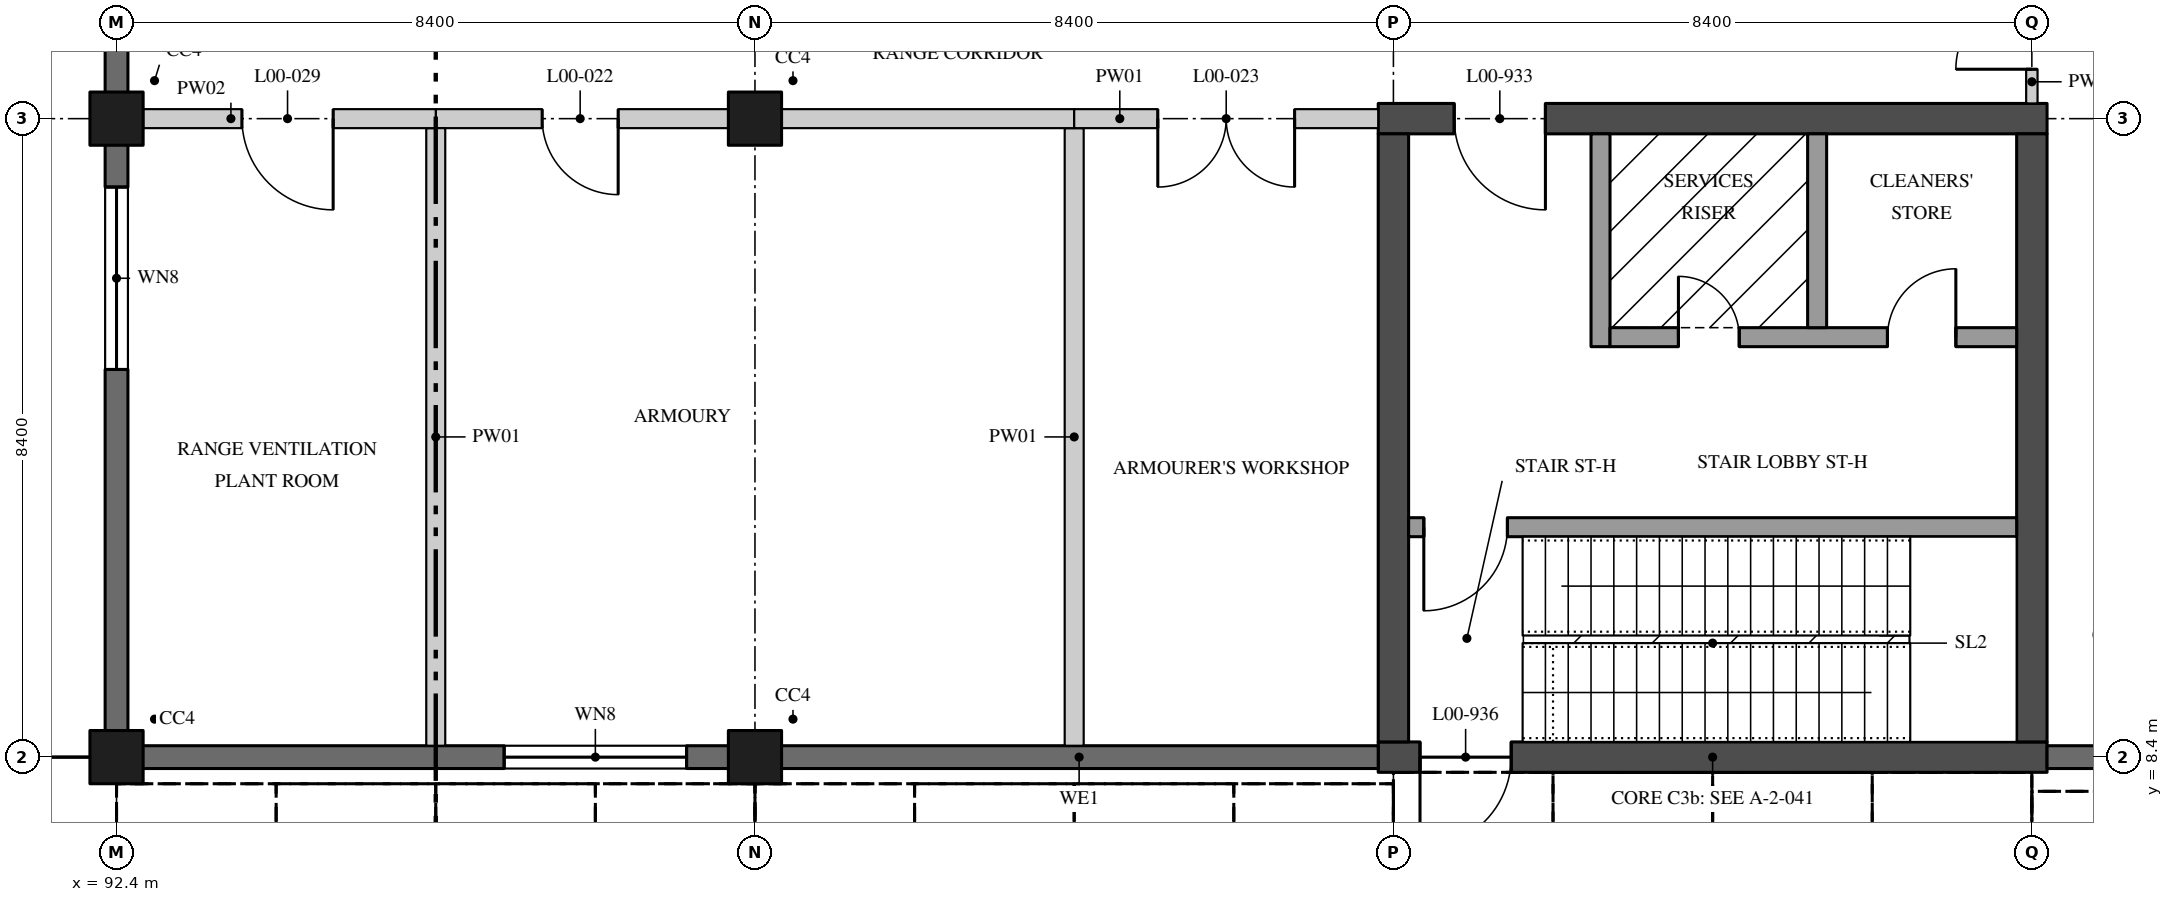
"""IFC4 building model, lengths in metres.
Left out: names, types, materials, properties, quantities, classifications, styles, units other than length and angle.
Written with IfcOpenShell. Run it as: python <this file> out.ifc"""

import sys

from ifc_helpers import new_model, si_unit, direction, frame, frame_2d, origin, origin_2d, place, context, subcontext, project, spatial, rectangle, extrude, element, fill, save


model = new_model("IFC4")
c1 = context("Model", 3, precision=1e-05, world=origin(), true_north=direction((0.0, 1.0)))
c2 = subcontext(c1, "Body", "Model", "MODEL_VIEW")
j1 = project(units=[si_unit("LENGTHUNIT", "METRE"), si_unit("PLANEANGLEUNIT", "RADIAN")], contexts=[c1])
p1 = place(None, origin())
s1 = spatial("IfcSite", under=j1, at=p1, CompositionType="ELEMENT")
p2 = place(p1, origin())
s2 = spatial("IfcBuilding", under=s1, at=p2, CompositionType="ELEMENT")
p3 = place(p2, origin())
s3 = spatial("IfcBuildingStorey", under=s2, at=p3, CompositionType="ELEMENT", Elevation=0.0)
for number, where, z_axis, x_axis in (
    (1, (92.4, 8.4, 0.0), (0.0, 0.0, 1.0), (1.0, 0.0, 0.0)),
    (2, (92.4, 16.8, 0.0), (0.0, 0.0, 1.0), (1.0, 0.0, 0.0)),
    (3, (100.8, 8.4, 0.0), (0.0, 0.0, 1.0), (1.0, 0.0, 0.0)),
    (4, (100.8, 16.8, 0.0), (0.0, 0.0, 1.0), (1.0, 0.0, 0.0)),
):
    element("IfcColumn", number, at=place(p3, frame(where, z_axis=z_axis, x_axis=x_axis)), inside=s3, PredefinedType="COLUMN", context=c2, shape_type="SweptSolid", body=[
        extrude(rectangle(XDim=0.7, YDim=0.7, at=origin_2d()), origin(), (0.0, 0.0, 1.0), 5.05),
    ])
p4 = place(p3, frame((109.0, 8.4, 0.0), z_axis=(0.0, 0.0, 1.0), x_axis=(1.0, 0.0, 0.0)))
e5 = element("IfcWall", 5, at=p4, inside=s3, PredefinedType="SHEAR", context=c2, shape_type="SweptSolid", body=[
    extrude(rectangle(XDim=8.8, YDim=0.4, at=frame_2d((4.4, 0.0))), origin(), (0.0, 0.0, 1.0), 5.05),
])
p5 = place(p4, frame((0.55, 0.0, 0.0)))
e6 = element("IfcOpeningElement", 6, at=p5, cuts=e5, PredefinedType="OPENING", context=c2, shape_type="SweptSolid", body=[
    extrude(rectangle(XDim=1.2, YDim=2.1, at=frame_2d((0.6, 1.05))), frame((0.0, 0.21, 0.0), z_axis=(0.0, -1.0, 0.0), x_axis=(1.0, 0.0, 0.0)), (0.0, 0.0, 1.0), 0.42),
])
p6 = place(p3, frame((109.0, 16.8, 0.0), z_axis=(0.0, 0.0, 1.0), x_axis=(1.0, 0.0, 0.0)))
e7 = element("IfcWall", 7, at=p6, inside=s3, PredefinedType="SHEAR", context=c2, shape_type="SweptSolid", body=[
    extrude(rectangle(XDim=8.8, YDim=0.4, at=frame_2d((4.4, 0.0))), origin(), (0.0, 0.0, 1.0), 5.05),
])
p7 = place(p6, frame((1.0, 0.0, 0.0)))
e8 = element("IfcOpeningElement", 8, at=p7, cuts=e7, PredefinedType="OPENING", context=c2, shape_type="SweptSolid", body=[
    extrude(rectangle(XDim=1.2, YDim=2.1, at=frame_2d((0.6, 1.05))), frame((0.0, 0.21, 0.0), z_axis=(0.0, -1.0, 0.0), x_axis=(1.0, 0.0, 0.0)), (0.0, 0.0, 1.0), 0.42),
])
for number, where, z_axis, x_axis in (
    (9, (109.2, 8.6, 0.0), (0.0, 0.0, 1.0), (0.0, 1.0, 0.0)),
    (10, (117.6, 8.6, 0.0), (0.0, 0.0, 1.0), (0.0, 1.0, 0.0)),
):
    element("IfcWall", number, at=place(p3, frame(where, z_axis=z_axis, x_axis=x_axis)), inside=s3, PredefinedType="SHEAR", context=c2, shape_type="SweptSolid", body=[
        extrude(rectangle(XDim=8.0, YDim=0.4, at=frame_2d((4.0, 0.0))), origin(), (0.0, 0.0, 1.0), 5.05),
    ])
p8 = place(p3, frame((109.4, 11.425, 0.0), z_axis=(0.0, 0.0, 1.0), x_axis=(1.0, 0.0, 0.0)))
e11 = element("IfcWall", 11, at=p8, inside=s3, PredefinedType="SOLIDWALL", context=c2, shape_type="SweptSolid", body=[
    extrude(rectangle(XDim=8.0, YDim=0.25, at=frame_2d((4.0, 0.0))), origin(), (0.0, 0.0, 1.0), 5.05),
])
p9 = place(p8, frame((0.2, 0.0, 0.0)))
e12 = element("IfcOpeningElement", 12, at=p9, cuts=e11, PredefinedType="OPENING", context=c2, shape_type="SweptSolid", body=[
    extrude(rectangle(XDim=1.1, YDim=2.1, at=frame_2d((0.55, 1.05))), frame((0.0, 0.135, 0.0), z_axis=(0.0, -1.0, 0.0), x_axis=(1.0, 0.0, 0.0)), (0.0, 0.0, 1.0), 0.27),
])
p10 = place(p3, frame((111.925, 13.8, 0.0), z_axis=(0.0, 0.0, 1.0), x_axis=(0.0, 1.0, 0.0)))
e13 = element("IfcWall", 13, at=p10, inside=s3, PredefinedType="SOLIDWALL", context=c2, shape_type="SweptSolid", body=[
    extrude(rectangle(XDim=2.8, YDim=0.25, at=frame_2d((1.4, 0.0))), origin(), (0.0, 0.0, 1.0), 5.05),
])
p11 = place(p3, frame((112.05, 13.925, 0.0), z_axis=(0.0, 0.0, 1.0), x_axis=(1.0, 0.0, 0.0)))
e14 = element("IfcWall", 14, at=p11, inside=s3, PredefinedType="SOLIDWALL", context=c2, shape_type="SweptSolid", body=[
    extrude(rectangle(XDim=5.35, YDim=0.25, at=frame_2d((2.675, 0.0))), origin(), (0.0, 0.0, 1.0), 5.05),
])
p12 = place(p11, frame((3.65, 0.0, 0.0)))
e15 = element("IfcOpeningElement", 15, at=p12, cuts=e14, PredefinedType="OPENING", context=c2, shape_type="SweptSolid", body=[
    extrude(rectangle(XDim=0.9, YDim=2.1, at=frame_2d((0.45, 1.05))), frame((0.0, 0.135, 0.0), z_axis=(0.0, -1.0, 0.0), x_axis=(1.0, 0.0, 0.0)), (0.0, 0.0, 1.0), 0.27),
])
p13 = place(p11, frame((0.9, 0.0, 0.0)))
e16 = element("IfcOpeningElement", 16, at=p13, cuts=e14, PredefinedType="OPENING", context=c2, shape_type="SweptSolid", body=[
    extrude(rectangle(XDim=0.8, YDim=2.1, at=frame_2d((0.4, 1.05))), frame((0.0, 0.135, 0.0), z_axis=(0.0, -1.0, 0.0), x_axis=(1.0, 0.0, 0.0)), (0.0, 0.0, 1.0), 0.27),
])
p14 = place(p3, frame((114.775, 14.05, 0.0), z_axis=(0.0, 0.0, 1.0), x_axis=(0.0, 1.0, 0.0)))
e17 = element("IfcWall", 17, at=p14, inside=s3, PredefinedType="SOLIDWALL", context=c2, shape_type="SweptSolid", body=[
    extrude(rectangle(XDim=2.55, YDim=0.25, at=frame_2d((1.275, 0.0))), origin(), (0.0, 0.0, 1.0), 5.05),
])
p15 = place(p3, frame((105.0, 8.55, 0.0), z_axis=(0.0, 0.0, 1.0), x_axis=(0.0, 1.0, 0.0)))
e18 = element("IfcWall", 18, at=p15, inside=s3, PredefinedType="PARTITIONING", context=c2, shape_type="SweptSolid", body=[
    extrude(rectangle(XDim=8.125, YDim=0.25, at=frame_2d((4.062, 0.0))), origin(), (0.0, 0.0, 1.0), 5.05),
])
p16 = place(p3, frame((96.6, 16.8, 0.0), z_axis=(0.0, 0.0, 1.0), x_axis=(1.0, 0.0, 0.0)))
e19 = element("IfcWall", 19, at=p16, inside=s3, PredefinedType="PARTITIONING", context=c2, shape_type="SweptSolid", body=[
    extrude(rectangle(XDim=3.85, YDim=0.25, at=frame_2d((1.925, 0.0))), origin(), (0.0, 0.0, 1.0), 5.05),
])
p17 = place(p16, frame((1.4, 0.0, 0.0)))
e20 = element("IfcOpeningElement", 20, at=p17, cuts=e19, PredefinedType="OPENING", context=c2, shape_type="SweptSolid", body=[
    extrude(rectangle(XDim=1.0, YDim=2.1, at=frame_2d((0.5, 1.05))), frame((0.0, 0.135, 0.0), z_axis=(0.0, -1.0, 0.0), x_axis=(1.0, 0.0, 0.0)), (0.0, 0.0, 1.0), 0.27),
])
p18 = place(p3, frame((101.15, 16.8, 0.0), z_axis=(0.0, 0.0, 1.0), x_axis=(1.0, 0.0, 0.0)))
e21 = element("IfcWall", 21, at=p18, inside=s3, PredefinedType="PARTITIONING", context=c2, shape_type="SweptSolid", body=[
    extrude(rectangle(XDim=3.85, YDim=0.25, at=frame_2d((1.925, 0.0))), origin(), (0.0, 0.0, 1.0), 5.05),
])
p19 = place(p3, frame((96.6, 8.55, 0.0), z_axis=(0.0, 0.0, 1.0), x_axis=(0.0, 1.0, 0.0)))
e22 = element("IfcWall", 22, at=p19, inside=s3, PredefinedType="PARTITIONING", context=c2, shape_type="SweptSolid", body=[
    extrude(rectangle(XDim=8.125, YDim=0.25, at=frame_2d((4.062, 0.0))), origin(), (0.0, 0.0, 1.0), 5.05),
])
p20 = place(p3, frame((105.0, 16.8, 0.0), z_axis=(0.0, 0.0, 1.0), x_axis=(1.0, 0.0, 0.0)))
e23 = element("IfcWall", 23, at=p20, inside=s3, PredefinedType="PARTITIONING", context=c2, shape_type="SweptSolid", body=[
    extrude(rectangle(XDim=4.0, YDim=0.25, at=frame_2d((2.0, 0.0))), origin(), (0.0, 0.0, 1.0), 5.05),
])
p21 = place(p20, frame((1.1, 0.0, 0.0)))
e24 = element("IfcOpeningElement", 24, at=p21, cuts=e23, PredefinedType="OPENING", context=c2, shape_type="SweptSolid", body=[
    extrude(rectangle(XDim=1.8, YDim=2.7, at=frame_2d((0.9, 1.35))), frame((0.0, 0.135, 0.0), z_axis=(0.0, -1.0, 0.0), x_axis=(1.0, 0.0, 0.0)), (0.0, 0.0, 1.0), 0.27),
])
p22 = place(p3, frame((117.6, 17.0, 0.0), z_axis=(0.0, 0.0, 1.0), x_axis=(0.0, 1.0, 0.0)))
e25 = element("IfcWall", 25, at=p22, inside=s3, PredefinedType="PARTITIONING", context=c2, shape_type="SweptSolid", body=[
    extrude(rectangle(XDim=1.9, YDim=0.15, at=frame_2d((0.95, 0.0))), origin(), (0.0, 0.0, 1.0), 8.375),
])
p23 = place(p22, frame((0.45, 0.0, 0.0)))
e26 = element("IfcOpeningElement", 26, at=p23, cuts=e25, PredefinedType="OPENING", context=c2, shape_type="SweptSolid", body=[
    extrude(rectangle(XDim=1.0, YDim=2.1, at=frame_2d((0.5, 1.05))), frame((0.0, 0.085, 0.0), z_axis=(0.0, -1.0, 0.0), x_axis=(1.0, 0.0, 0.0)), (0.0, 0.0, 1.0), 0.17),
])
p24 = place(p3, frame((92.75, 16.8, 0.0), z_axis=(0.0, 0.0, 1.0), x_axis=(1.0, 0.0, 0.0)))
e27 = element("IfcWall", 27, at=p24, inside=s3, PredefinedType="PARTITIONING", context=c2, shape_type="SweptSolid", body=[
    extrude(rectangle(XDim=3.85, YDim=0.25, at=frame_2d((1.925, 0.0))), origin(), (0.0, 0.0, 1.0), 5.05),
])
p25 = place(p24, frame((1.3, 0.0, 0.0)))
e28 = element("IfcOpeningElement", 28, at=p25, cuts=e27, PredefinedType="OPENING", context=c2, shape_type="SweptSolid", body=[
    extrude(rectangle(XDim=1.2, YDim=2.4, at=frame_2d((0.6, 1.2))), frame((0.0, 0.135, 0.0), z_axis=(0.0, -1.0, 0.0), x_axis=(1.0, 0.0, 0.0)), (0.0, 0.0, 1.0), 0.27),
])
p26 = place(p3, frame((92.4, 25.0, 0.0), z_axis=(0.0, 0.0, 1.0), x_axis=(0.0, -1.0, 0.0)))
e29 = element("IfcWall", 29, at=p26, inside=s3, PredefinedType="SOLIDWALL", context=c2, shape_type="SweptSolid", body=[
    extrude(rectangle(XDim=7.87, YDim=0.3, at=frame_2d((3.935, 0.0))), origin(), (0.0, 0.0, 1.0), 5.05),
])
p27 = place(p3, frame((92.4, 16.47, 0.0), z_axis=(0.0, 0.0, 1.0), x_axis=(0.0, -1.0, 0.0)))
e30 = element("IfcWall", 30, at=p27, inside=s3, PredefinedType="SOLIDWALL", context=c2, shape_type="SweptSolid", body=[
    extrude(rectangle(XDim=7.74, YDim=0.3, at=frame_2d((3.87, 0.0))), origin(), (0.0, 0.0, 1.0), 5.05),
])
p28 = place(p27, frame((0.57, 0.0, 0.6)))
e31 = element("IfcOpeningElement", 31, at=p28, cuts=e30, PredefinedType="OPENING", context=c2, shape_type="SweptSolid", body=[
    extrude(rectangle(XDim=2.4, YDim=2.1, at=frame_2d((1.2, 1.05))), frame((0.0, 0.16, 0.0), z_axis=(0.0, -1.0, 0.0), x_axis=(1.0, 0.0, 0.0)), (0.0, 0.0, 1.0), 0.32),
])
p29 = place(p3, frame((92.73, 8.4, 0.0), z_axis=(0.0, 0.0, 1.0), x_axis=(1.0, 0.0, 0.0)))
e32 = element("IfcWall", 32, at=p29, inside=s3, PredefinedType="SOLIDWALL", context=c2, shape_type="SweptSolid", body=[
    extrude(rectangle(XDim=7.74, YDim=0.3, at=frame_2d((3.87, 0.0))), origin(), (0.0, 0.0, 1.0), 5.05),
])
p30 = place(p29, frame((4.77, 0.0, 0.6)))
e33 = element("IfcOpeningElement", 33, at=p30, cuts=e32, PredefinedType="OPENING", context=c2, shape_type="SweptSolid", body=[
    extrude(rectangle(XDim=2.4, YDim=2.1, at=frame_2d((1.2, 1.05))), frame((0.0, 0.16, 0.0), z_axis=(0.0, -1.0, 0.0), x_axis=(1.0, 0.0, 0.0)), (0.0, 0.0, 1.0), 0.32),
])
p31 = place(p3, frame((101.13, 8.4, 0.0), z_axis=(0.0, 0.0, 1.0), x_axis=(1.0, 0.0, 0.0)))
e34 = element("IfcWall", 34, at=p31, inside=s3, PredefinedType="SOLIDWALL", context=c2, shape_type="SweptSolid", body=[
    extrude(rectangle(XDim=7.87, YDim=0.3, at=frame_2d((3.935, 0.0))), origin(), (0.0, 0.0, 1.0), 5.05),
])
p32 = place(p3, frame((117.8, 8.4, 0.0), z_axis=(0.0, 0.0, 1.0), x_axis=(1.0, 0.0, 0.0)))
e35 = element("IfcWall", 35, at=p32, inside=s3, PredefinedType="SOLIDWALL", context=c2, shape_type="SweptSolid", body=[
    extrude(rectangle(XDim=7.87, YDim=0.3, at=frame_2d((3.935, 0.0))), origin(), (0.0, 0.0, 1.0), 5.4),
])
p33 = place(p32, frame((5.2, 0.0, 0.0)))
e36 = element("IfcOpeningElement", 36, at=p33, cuts=e35, PredefinedType="OPENING", context=c2, shape_type="SweptSolid", body=[
    extrude(rectangle(XDim=1.8, YDim=2.4, at=frame_2d((0.9, 1.2))), frame((0.0, 0.16, 0.0), z_axis=(0.0, -1.0, 0.0), x_axis=(1.0, 0.0, 0.0)), (0.0, 0.0, 1.0), 0.32),
])
p34 = place(p12, origin())
e37 = element("IfcDoor", 37, at=p34, inside=s3, OperationType="SINGLE_SWING_LEFT", PredefinedType="DOOR", context=c2, shape_type="SweptSolid", body=[
    extrude(rectangle(XDim=0.9, YDim=2.1, at=frame_2d((0.45, 1.05))), frame((0.0, 0.035, 0.0), z_axis=(0.0, -1.0, 0.0), x_axis=(1.0, 0.0, 0.0)), (0.0, 0.0, 1.0), 0.07),
])
fill(e15, e37)
p35 = place(p7, frame((1.2, 0.0, 0.0), z_axis=(0.0, 0.0, 1.0), x_axis=(-1.0, 0.0, 0.0)))
e38 = element("IfcDoor", 38, at=p35, inside=s3, OperationType="SINGLE_SWING_RIGHT", PredefinedType="DOOR", context=c2, shape_type="SweptSolid", body=[
    extrude(rectangle(XDim=1.2, YDim=2.1, at=frame_2d((0.6, 1.05))), frame((0.0, 0.035, 0.0), z_axis=(0.0, -1.0, 0.0), x_axis=(1.0, 0.0, 0.0)), (0.0, 0.0, 1.0), 0.07),
])
fill(e8, e38)
p36 = place(p13, origin())
e39 = element("IfcDoor", 39, at=p36, inside=s3, OperationType="SINGLE_SWING_RIGHT", PredefinedType="DOOR", context=c2, shape_type="SweptSolid", body=[
    extrude(rectangle(XDim=0.8, YDim=2.1, at=frame_2d((0.4, 1.05))), frame((0.0, 0.035, 0.0), z_axis=(0.0, -1.0, 0.0), x_axis=(1.0, 0.0, 0.0)), (0.0, 0.0, 1.0), 0.07),
])
fill(e16, e39)
p37 = place(p9, frame((1.1, 0.0, 0.0), z_axis=(0.0, 0.0, 1.0), x_axis=(-1.0, 0.0, 0.0)))
e40 = element("IfcDoor", 40, at=p37, inside=s3, OperationType="SINGLE_SWING_LEFT", PredefinedType="DOOR", context=c2, shape_type="SweptSolid", body=[
    extrude(rectangle(XDim=1.1, YDim=2.1, at=frame_2d((0.55, 1.05))), frame((0.0, 0.035, 0.0), z_axis=(0.0, -1.0, 0.0), x_axis=(1.0, 0.0, 0.0)), (0.0, 0.0, 1.0), 0.07),
])
fill(e12, e40)
p38 = place(p5, frame((1.2, 0.0, 0.0), z_axis=(0.0, 0.0, 1.0), x_axis=(-1.0, 0.0, 0.0)))
e41 = element("IfcDoor", 41, at=p38, inside=s3, OperationType="SINGLE_SWING_LEFT", PredefinedType="DOOR", context=c2, shape_type="SweptSolid", body=[
    extrude(rectangle(XDim=1.2, YDim=2.1, at=frame_2d((0.6, 1.05))), frame((0.0, 0.035, 0.0), z_axis=(0.0, -1.0, 0.0), x_axis=(1.0, 0.0, 0.0)), (0.0, 0.0, 1.0), 0.07),
])
fill(e6, e41)
p39 = place(p17, frame((1.0, 0.0, 0.0), z_axis=(0.0, 0.0, 1.0), x_axis=(-1.0, 0.0, 0.0)))
e42 = element("IfcDoor", 42, at=p39, inside=s3, OperationType="SINGLE_SWING_RIGHT", PredefinedType="DOOR", context=c2, shape_type="SweptSolid", body=[
    extrude(rectangle(XDim=1.0, YDim=2.1, at=frame_2d((0.5, 1.05))), frame((0.0, 0.06, 0.0), z_axis=(0.0, -1.0, 0.0), x_axis=(1.0, 0.0, 0.0)), (0.0, 0.0, 1.0), 0.12),
])
fill(e20, e42)
p40 = place(p21, frame((1.8, 0.0, 0.0), z_axis=(0.0, 0.0, 1.0), x_axis=(-1.0, 0.0, 0.0)))
e43 = element("IfcDoor", 43, at=p40, inside=s3, OperationType="DOUBLE_DOOR_SINGLE_SWING", PredefinedType="DOOR", context=c2, shape_type="SweptSolid", body=[
    extrude(rectangle(XDim=1.8, YDim=2.7, at=frame_2d((0.9, 1.35))), frame((0.0, 0.05, 0.0), z_axis=(0.0, -1.0, 0.0), x_axis=(1.0, 0.0, 0.0)), (0.0, 0.0, 1.0), 0.1),
])
fill(e24, e43)
p41 = place(p23, origin())
e44 = element("IfcDoor", 44, at=p41, inside=s3, OperationType="SINGLE_SWING_RIGHT", PredefinedType="DOOR", context=c2, shape_type="SweptSolid", body=[
    extrude(rectangle(XDim=1.0, YDim=2.1, at=frame_2d((0.5, 1.05))), frame((0.0, 0.025, 0.0), z_axis=(0.0, -1.0, 0.0), x_axis=(1.0, 0.0, 0.0)), (0.0, 0.0, 1.0), 0.05),
])
fill(e26, e44)
p42 = place(p25, frame((1.2, 0.0, 0.0), z_axis=(0.0, 0.0, 1.0), x_axis=(-1.0, 0.0, 0.0)))
e45 = element("IfcDoor", 45, at=p42, inside=s3, OperationType="SINGLE_SWING_RIGHT", PredefinedType="DOOR", context=c2, shape_type="SweptSolid", body=[
    extrude(rectangle(XDim=1.2, YDim=2.4, at=frame_2d((0.6, 1.2))), frame((0.0, 0.05, 0.0), z_axis=(0.0, -1.0, 0.0), x_axis=(1.0, 0.0, 0.0)), (0.0, 0.0, 1.0), 0.1),
])
fill(e28, e45)
p43 = place(p28, origin())
e46 = element("IfcWindow", 46, at=p43, inside=s3, PartitioningType="SINGLE_PANEL", PredefinedType="WINDOW", context=c2, shape_type="SweptSolid", body=[
    extrude(rectangle(XDim=2.4, YDim=2.1, at=frame_2d((1.2, 1.05))), frame((0.0, 0.06, 0.0), z_axis=(0.0, -1.0, 0.0), x_axis=(1.0, 0.0, 0.0)), (0.0, 0.0, 1.0), 0.12),
])
fill(e31, e46)
p44 = place(p30, origin())
e47 = element("IfcWindow", 47, at=p44, inside=s3, PartitioningType="SINGLE_PANEL", PredefinedType="WINDOW", context=c2, shape_type="SweptSolid", body=[
    extrude(rectangle(XDim=2.4, YDim=2.1, at=frame_2d((1.2, 1.05))), frame((0.0, 0.06, 0.0), z_axis=(0.0, -1.0, 0.0), x_axis=(1.0, 0.0, 0.0)), (0.0, 0.0, 1.0), 0.12),
])
fill(e33, e47)
save(model, sys.argv[1])
